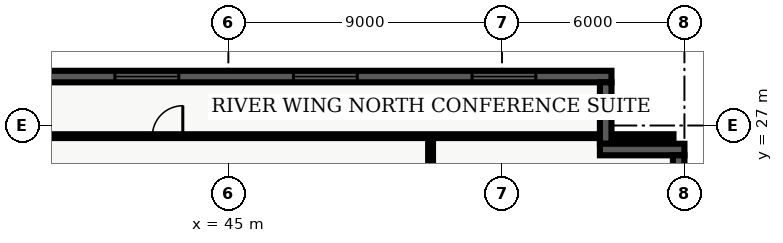
"""IFC4 building model, lengths in metres.
Left out: names, types, materials, properties, quantities, classifications, styles, units other than length and angle.
Written with IfcOpenShell. Run it as: python <this file> out.ifc"""

import sys

from ifc_helpers import new_model, entity, si_unit, converted_unit, direction, frame, origin_with_axes, origin_2d_with_axis, place, context, subcontext, project, spatial, polyline, rectangle, outline, extrude, element, fill, save


model = new_model("IFC4")
c1 = context("Model", 3, precision=1e-05, world=origin_with_axes(), true_north=direction((0.0, 1.0)))
c2 = subcontext(c1, "Body", "Model", "MODEL_VIEW")
j1 = project(units=[si_unit("LENGTHUNIT", "METRE"), converted_unit("PLANEANGLEUNIT", "DEGREE", entity("IfcPlaneAngleMeasure", 0.017), si_unit("PLANEANGLEUNIT", "RADIAN"), dimensions=[0, 0, 0, 0, 0, 0, 0])], contexts=[c1])
p1 = place(None, origin_with_axes())
s1 = spatial("IfcSite", under=j1, at=p1, CompositionType="ELEMENT")
p2 = place(p1, origin_with_axes())
s2 = spatial("IfcBuilding", under=s1, at=p2, CompositionType="ELEMENT")
p3 = place(p2, frame((0.0, 0.0, 112.5), z_axis=(0.0, 0.0, 1.0), x_axis=(1.0, 0.0, 0.0)))
s3 = spatial("IfcBuildingStorey", under=s2, at=p3, CompositionType="ELEMENT", Elevation=112.5)
p4 = place(p3, frame((51.65, 7.85, 0.0), z_axis=(0.0, 0.0, 1.0), x_axis=(0.0, 1.0, 0.0)))
e1 = element("IfcWall", 1, at=p4, inside=s3, PredefinedType="PARTITIONING", context=c2, shape_type="SweptSolid", body=[
    extrude(outline(polyline([(0.0, -0.08), (18.8, -0.08), (18.8, 0.08), (0.0, 0.08), (0.0, -0.08)])), origin_with_axes(), (0.0, 0.0, 1.0), 2.7),
])
p5 = place(p4, frame((4.27, 0.0, 0.0), z_axis=(0.0, 0.0, 1.0), x_axis=(1.0, 0.0, 0.0)))
e2 = element("IfcOpeningElement", 2, at=p5, cuts=e1, PredefinedType="OPENING", context=c2, shape_type="SweptSolid", body=[
    extrude(rectangle(XDim=1.0, YDim=0.18, at=origin_2d_with_axis()), origin_with_axes(), (0.0, 0.0, 1.0), 2.15),
])
p6 = place(p4, frame((7.889, 0.0, 0.0), z_axis=(0.0, 0.0, 1.0), x_axis=(1.0, 0.0, 0.0)))
e3 = element("IfcOpeningElement", 3, at=p6, cuts=e1, PredefinedType="OPENING", context=c2, shape_type="SweptSolid", body=[
    extrude(rectangle(XDim=1.0, YDim=0.18, at=origin_2d_with_axis()), origin_with_axes(), (0.0, 0.0, 1.0), 2.15),
])
p7 = place(p4, frame((14.069, 0.0, 0.0), z_axis=(0.0, 0.0, 1.0), x_axis=(1.0, 0.0, 0.0)))
e4 = element("IfcOpeningElement", 4, at=p7, cuts=e1, PredefinedType="OPENING", context=c2, shape_type="SweptSolid", body=[
    extrude(rectangle(XDim=1.0, YDim=0.18, at=origin_2d_with_axis()), origin_with_axes(), (0.0, 0.0, 1.0), 2.15),
])
p8 = place(p3, frame((38.76, 26.65, 0.0), z_axis=(0.0, 0.0, 1.0), x_axis=(1.0, 0.0, 0.0)))
e5 = element("IfcWall", 5, at=p8, inside=s3, PredefinedType="PARTITIONING", context=c2, shape_type="SweptSolid", body=[
    extrude(outline(polyline([(0.0, -0.062), (20.88, -0.062), (20.88, 0.062), (0.0, 0.062), (0.0, -0.062)])), origin_with_axes(), (0.0, 0.0, 1.0), 2.7),
])
p9 = place(p8, frame((4.24, 0.0, 0.0), z_axis=(0.0, 0.0, 1.0), x_axis=(1.0, 0.0, 0.0)))
e6 = element("IfcOpeningElement", 6, at=p9, cuts=e5, PredefinedType="OPENING", context=c2, shape_type="SweptSolid", body=[
    extrude(rectangle(XDim=1.0, YDim=0.145, at=origin_2d_with_axis()), origin_with_axes(), (0.0, 0.0, 1.0), 2.15),
])
p10 = place(p3, frame((38.78, 28.61, 0.0), z_axis=(0.0, 0.0, 1.0), x_axis=(1.0, 0.0, 0.0)))
e7 = element("IfcWall", 7, at=p10, inside=s3, PredefinedType="SOLIDWALL", context=c2, shape_type="SweptSolid", body=[
    extrude(outline(polyline([(0.0, -0.19), (18.82, -0.19), (18.82, 0.19), (0.0, 0.19), (0.0, -0.19)])), origin_with_axes(), (0.0, 0.0, 1.0), 3.66),
])
p11 = place(p10, frame((3.537, 0.0, 0.45), z_axis=(0.0, 0.0, 1.0), x_axis=(1.0, 0.0, 0.0)))
e8 = element("IfcOpeningElement", 8, at=p11, cuts=e7, PredefinedType="OPENING", context=c2, shape_type="SweptSolid", body=[
    extrude(rectangle(XDim=2.1, YDim=0.4, at=origin_2d_with_axis()), origin_with_axes(), (0.0, 0.0, 1.0), 2.2),
])
p12 = place(p10, frame((9.41, 0.0, 0.45), z_axis=(0.0, 0.0, 1.0), x_axis=(1.0, 0.0, 0.0)))
e9 = element("IfcOpeningElement", 9, at=p12, cuts=e7, PredefinedType="OPENING", context=c2, shape_type="SweptSolid", body=[
    extrude(rectangle(XDim=2.1, YDim=0.4, at=origin_2d_with_axis()), origin_with_axes(), (0.0, 0.0, 1.0), 2.2),
])
p13 = place(p10, frame((15.283, 0.0, 0.45), z_axis=(0.0, 0.0, 1.0), x_axis=(1.0, 0.0, 0.0)))
e10 = element("IfcOpeningElement", 10, at=p13, cuts=e7, PredefinedType="OPENING", context=c2, shape_type="SweptSolid", body=[
    extrude(rectangle(XDim=2.1, YDim=0.4, at=origin_2d_with_axis()), origin_with_axes(), (0.0, 0.0, 1.0), 2.2),
])
p14 = place(p3, frame((57.41, 28.42, 0.0), z_axis=(0.0, 0.0, 1.0), x_axis=(0.0, -1.0, 0.0)))
e11 = element("IfcWall", 11, at=p14, inside=s3, PredefinedType="SOLIDWALL", context=c2, shape_type="SweptSolid", body=[
    extrude(outline(polyline([(0.0, -0.19), (2.02, -0.19), (2.02, 0.19), (0.0, 0.19), (0.0, -0.19)])), origin_with_axes(), (0.0, 0.0, 1.0), 3.66),
])
p15 = place(p3, frame((57.22, 26.21, 0.0), z_axis=(0.0, 0.0, 1.0), x_axis=(1.0, 0.0, 0.0)))
e12 = element("IfcWall", 12, at=p15, inside=s3, PredefinedType="SOLIDWALL", context=c2, shape_type="SweptSolid", body=[
    extrude(outline(polyline([(0.0, -0.19), (2.78, -0.19), (2.78, 0.19), (0.0, 0.19), (0.0, -0.19)])), origin_with_axes(), (0.0, 0.0, 1.0), 3.66),
])
p16 = place(p3, frame((59.81, 26.02, 0.0), z_axis=(0.0, 0.0, 1.0), x_axis=(0.0, -1.0, 0.0)))
e13 = element("IfcWall", 13, at=p16, inside=s3, PredefinedType="SOLIDWALL", context=c2, shape_type="SweptSolid", body=[
    extrude(outline(polyline([(0.0, -0.19), (23.62, -0.19), (23.62, 0.19), (0.0, 0.19), (0.0, -0.19)])), origin_with_axes(), (0.0, 0.0, 1.0), 3.66),
])
p17 = place(p16, frame((3.853, 0.0, 0.45), z_axis=(0.0, 0.0, 1.0), x_axis=(1.0, 0.0, 0.0)))
e14 = element("IfcOpeningElement", 14, at=p17, cuts=e13, PredefinedType="OPENING", context=c2, shape_type="SweptSolid", body=[
    extrude(rectangle(XDim=2.1, YDim=0.4, at=origin_2d_with_axis()), origin_with_axes(), (0.0, 0.0, 1.0), 2.2),
])
p18 = place(p16, frame((20.218, 0.0, 0.45), z_axis=(0.0, 0.0, 1.0), x_axis=(1.0, 0.0, 0.0)))
e15 = element("IfcOpeningElement", 15, at=p18, cuts=e13, PredefinedType="OPENING", context=c2, shape_type="SweptSolid", body=[
    extrude(rectangle(XDim=2.1, YDim=0.4, at=origin_2d_with_axis()), origin_with_axes(), (0.0, 0.0, 1.0), 2.2),
])
p19 = place(p8, frame((4.24, 0.0, 0.0), z_axis=(0.0, 0.0, 1.0), x_axis=(1.0, 0.0, 0.0)))
e16 = element("IfcDoor", 16, at=p19, inside=s3, OperationType="SINGLE_SWING_RIGHT", PredefinedType="DOOR", context=c2, shape_type="SweptSolid", body=[
    extrude(rectangle(XDim=1.0, YDim=0.075, at=origin_2d_with_axis()), origin_with_axes(), (0.0, 0.0, 1.0), 2.15),
])
fill(e6, e16)
p20 = place(p10, frame((3.537, 0.0, 0.45), z_axis=(0.0, 0.0, 1.0), x_axis=(1.0, 0.0, 0.0)))
e17 = element("IfcWindow", 17, at=p20, inside=s3, PredefinedType="WINDOW", context=c2, shape_type="SweptSolid", body=[
    extrude(rectangle(XDim=2.1, YDim=0.09, at=origin_2d_with_axis()), origin_with_axes(), (0.0, 0.0, 1.0), 2.2),
])
fill(e8, e17)
p21 = place(p10, frame((9.41, 0.0, 0.45), z_axis=(0.0, 0.0, 1.0), x_axis=(1.0, 0.0, 0.0)))
e18 = element("IfcWindow", 18, at=p21, inside=s3, PredefinedType="WINDOW", context=c2, shape_type="SweptSolid", body=[
    extrude(rectangle(XDim=2.1, YDim=0.09, at=origin_2d_with_axis()), origin_with_axes(), (0.0, 0.0, 1.0), 2.2),
])
fill(e9, e18)
p22 = place(p10, frame((15.283, 0.0, 0.45), z_axis=(0.0, 0.0, 1.0), x_axis=(1.0, 0.0, 0.0)))
e19 = element("IfcWindow", 19, at=p22, inside=s3, PredefinedType="WINDOW", context=c2, shape_type="SweptSolid", body=[
    extrude(rectangle(XDim=2.1, YDim=0.09, at=origin_2d_with_axis()), origin_with_axes(), (0.0, 0.0, 1.0), 2.2),
])
fill(e10, e19)
save(model, sys.argv[1])
